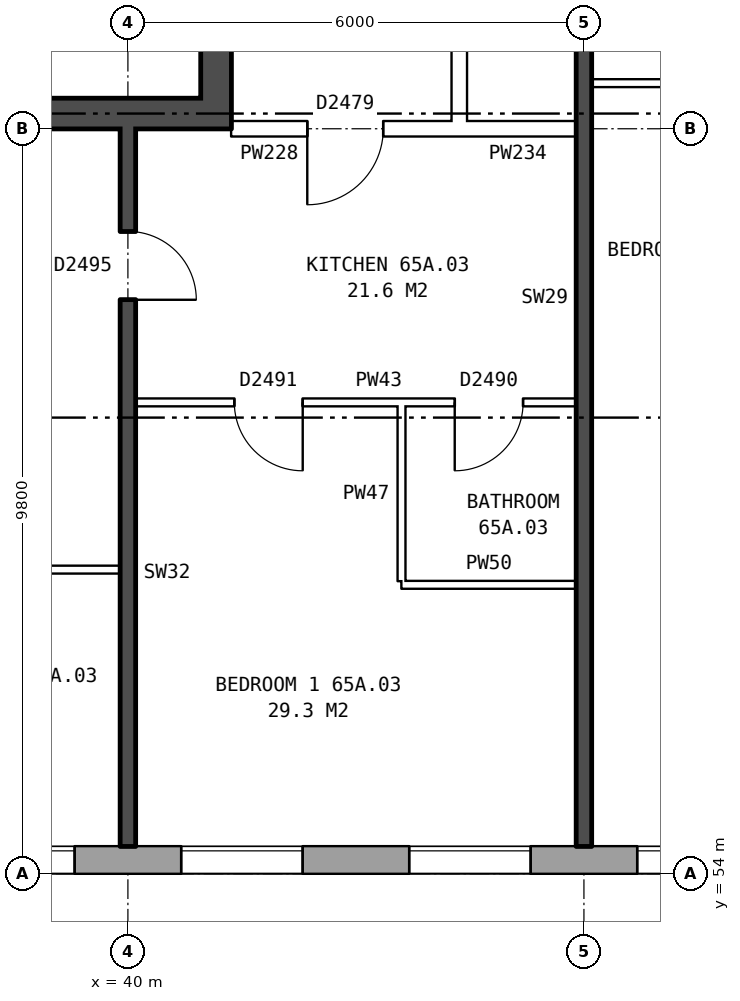
"""IFC4 building model, lengths in metres.
Left out: names, types, materials, properties, quantities, classifications, styles, units other than length and angle.
Written with IfcOpenShell. Run it as: python <this file> out.ifc"""

import sys

from ifc_helpers import new_model, si_unit, direction, frame, frame_2d, origin, place, context, subcontext, project, spatial, rectangle, extrude, element, fill, save


model = new_model("IFC4")
c1 = context("Model", 3, precision=1e-05, world=origin(), true_north=direction((0.0, 1.0)))
c2 = subcontext(c1, "Body", "Model", "MODEL_VIEW")
j1 = project(units=[si_unit("LENGTHUNIT", "METRE"), si_unit("PLANEANGLEUNIT", "RADIAN")], contexts=[c1])
p1 = place(None, origin())
s1 = spatial("IfcSite", under=j1, at=p1, CompositionType="ELEMENT")
p2 = place(p1, origin())
s2 = spatial("IfcBuilding", under=s1, at=p2, CompositionType="ELEMENT")
p3 = place(p2, frame((0.0, 0.0, 230.7)))
s3 = spatial("IfcBuildingStorey", under=s2, at=p3, CompositionType="ELEMENT", Elevation=230.7)
p4 = place(p3, frame((35.075, 54.18, 0.0), z_axis=(0.0, 0.0, 1.0), x_axis=(1.0, 0.0, 0.0)))
e1 = element("IfcWall", 1, at=p4, inside=s3, PredefinedType="STANDARD", context=c2, shape_type="SweptSolid", body=[
    extrude(rectangle(XDim=39.875, YDim=0.36, at=frame_2d((19.938, 0.0))), origin(), (0.0, 0.0, 1.0), 2.85),
])
p5 = place(p4, frame((2.625, 0.0, 0.8)))
e2 = element("IfcOpeningElement", 2, at=p5, cuts=e1, PredefinedType="OPENING", context=c2, shape_type="SweptSolid", body=[
    extrude(rectangle(XDim=1.6, YDim=1.8, at=frame_2d((0.8, 0.9))), frame((0.0, 0.19, 0.0), z_axis=(0.0, -1.0, 0.0), x_axis=(1.0, 0.0, 0.0)), (0.0, 0.0, 1.0), 0.38),
])
p6 = place(p4, frame((5.625, 0.0, 0.8)))
e3 = element("IfcOpeningElement", 3, at=p6, cuts=e1, PredefinedType="OPENING", context=c2, shape_type="SweptSolid", body=[
    extrude(rectangle(XDim=1.6, YDim=1.8, at=frame_2d((0.8, 0.9))), frame((0.0, 0.19, 0.0), z_axis=(0.0, -1.0, 0.0), x_axis=(1.0, 0.0, 0.0)), (0.0, 0.0, 1.0), 0.38),
])
p7 = place(p4, frame((8.625, 0.0, 0.8)))
e4 = element("IfcOpeningElement", 4, at=p7, cuts=e1, PredefinedType="OPENING", context=c2, shape_type="SweptSolid", body=[
    extrude(rectangle(XDim=1.6, YDim=1.8, at=frame_2d((0.8, 0.9))), frame((0.0, 0.19, 0.0), z_axis=(0.0, -1.0, 0.0), x_axis=(1.0, 0.0, 0.0)), (0.0, 0.0, 1.0), 0.38),
])
p8 = place(p4, frame((11.625, 0.0, 0.8)))
e5 = element("IfcOpeningElement", 5, at=p8, cuts=e1, PredefinedType="OPENING", context=c2, shape_type="SweptSolid", body=[
    extrude(rectangle(XDim=1.6, YDim=1.8, at=frame_2d((0.8, 0.9))), frame((0.0, 0.19, 0.0), z_axis=(0.0, -1.0, 0.0), x_axis=(1.0, 0.0, 0.0)), (0.0, 0.0, 1.0), 0.38),
])
p9 = place(p4, frame((14.075, 0.0, 0.8)))
e6 = element("IfcOpeningElement", 6, at=p9, cuts=e1, PredefinedType="OPENING", context=c2, shape_type="SweptSolid", body=[
    extrude(rectangle(XDim=1.0, YDim=1.8, at=frame_2d((0.5, 0.9))), frame((0.0, 0.19, 0.0), z_axis=(0.0, -1.0, 0.0), x_axis=(1.0, 0.0, 0.0)), (0.0, 0.0, 1.0), 0.38),
])
p10 = place(p4, frame((17.625, 0.0, 0.8)))
e7 = element("IfcOpeningElement", 7, at=p10, cuts=e1, PredefinedType="OPENING", context=c2, shape_type="SweptSolid", body=[
    extrude(rectangle(XDim=1.6, YDim=1.8, at=frame_2d((0.8, 0.9))), frame((0.0, 0.19, 0.0), z_axis=(0.0, -1.0, 0.0), x_axis=(1.0, 0.0, 0.0)), (0.0, 0.0, 1.0), 0.38),
])
p11 = place(p4, frame((20.125, 0.0, 0.8)))
e8 = element("IfcOpeningElement", 8, at=p11, cuts=e1, PredefinedType="OPENING", context=c2, shape_type="SweptSolid", body=[
    extrude(rectangle(XDim=0.6, YDim=1.2, at=frame_2d((0.3, 0.6))), frame((0.0, 0.19, 0.0), z_axis=(0.0, -1.0, 0.0), x_axis=(1.0, 0.0, 0.0)), (0.0, 0.0, 1.0), 0.38),
])
p12 = place(p4, frame((23.625, 0.0, 0.8)))
e9 = element("IfcOpeningElement", 9, at=p12, cuts=e1, PredefinedType="OPENING", context=c2, shape_type="SweptSolid", body=[
    extrude(rectangle(XDim=1.6, YDim=1.8, at=frame_2d((0.8, 0.9))), frame((0.0, 0.19, 0.0), z_axis=(0.0, -1.0, 0.0), x_axis=(1.0, 0.0, 0.0)), (0.0, 0.0, 1.0), 0.38),
])
p13 = place(p4, frame((26.625, 0.0, 0.8)))
e10 = element("IfcOpeningElement", 10, at=p13, cuts=e1, PredefinedType="OPENING", context=c2, shape_type="SweptSolid", body=[
    extrude(rectangle(XDim=1.6, YDim=1.8, at=frame_2d((0.8, 0.9))), frame((0.0, 0.19, 0.0), z_axis=(0.0, -1.0, 0.0), x_axis=(1.0, 0.0, 0.0)), (0.0, 0.0, 1.0), 0.38),
])
p14 = place(p4, frame((29.625, 0.0, 0.8)))
e11 = element("IfcOpeningElement", 11, at=p14, cuts=e1, PredefinedType="OPENING", context=c2, shape_type="SweptSolid", body=[
    extrude(rectangle(XDim=1.6, YDim=1.8, at=frame_2d((0.8, 0.9))), frame((0.0, 0.19, 0.0), z_axis=(0.0, -1.0, 0.0), x_axis=(1.0, 0.0, 0.0)), (0.0, 0.0, 1.0), 0.38),
])
p15 = place(p4, frame((32.625, 0.0, 0.8)))
e12 = element("IfcOpeningElement", 12, at=p15, cuts=e1, PredefinedType="OPENING", context=c2, shape_type="SweptSolid", body=[
    extrude(rectangle(XDim=1.6, YDim=1.8, at=frame_2d((0.8, 0.9))), frame((0.0, 0.19, 0.0), z_axis=(0.0, -1.0, 0.0), x_axis=(1.0, 0.0, 0.0)), (0.0, 0.0, 1.0), 0.38),
])
p16 = place(p4, frame((35.625, 0.0, 0.8)))
e13 = element("IfcOpeningElement", 13, at=p16, cuts=e1, PredefinedType="OPENING", context=c2, shape_type="SweptSolid", body=[
    extrude(rectangle(XDim=1.6, YDim=1.8, at=frame_2d((0.8, 0.9))), frame((0.0, 0.19, 0.0), z_axis=(0.0, -1.0, 0.0), x_axis=(1.0, 0.0, 0.0)), (0.0, 0.0, 1.0), 0.38),
])
p17 = place(p4, frame((22.125, 0.0, 1.7)))
e14 = element("IfcOpeningElement", 14, at=p17, cuts=e1, PredefinedType="OPENING", context=c2, shape_type="SweptSolid", body=[
    extrude(rectangle(XDim=0.6, YDim=0.9, at=frame_2d((0.3, 0.45))), frame((0.0, 0.19, 0.0), z_axis=(0.0, -1.0, 0.0), x_axis=(1.0, 0.0, 0.0)), (0.0, 0.0, 1.0), 0.38),
])
p18 = place(p3, frame((41.16, 76.2, 0.0), z_axis=(0.0, 0.0, 1.0), x_axis=(0.0, -1.0, 0.0)))
e15 = element("IfcWall", 15, at=p18, inside=s3, PredefinedType="SHEAR", context=c2, shape_type="SweptSolid", body=[
    extrude(rectangle(XDim=12.4, YDim=0.4, at=frame_2d((6.2, 0.0))), origin(), (0.0, 0.0, 1.0), 2.85),
])
p19 = place(p18, frame((1.325, 0.0, 0.0)))
e16 = element("IfcOpeningElement", 16, at=p19, cuts=e15, PredefinedType="OPENING", context=c2, shape_type="SweptSolid", body=[
    extrude(rectangle(XDim=1.1, YDim=2.1, at=frame_2d((0.55, 1.05))), frame((0.0, 0.21, 0.0), z_axis=(0.0, -1.0, 0.0), x_axis=(1.0, 0.0, 0.0)), (0.0, 0.0, 1.0), 0.42),
])
p20 = place(p18, frame((4.225, 0.0, 0.0)))
e17 = element("IfcOpeningElement", 17, at=p20, cuts=e15, PredefinedType="OPENING", context=c2, shape_type="SweptSolid", body=[
    extrude(rectangle(XDim=0.85, YDim=2.1, at=frame_2d((0.425, 1.05))), frame((0.0, 0.21, 0.0), z_axis=(0.0, -1.0, 0.0), x_axis=(1.0, 0.0, 0.0)), (0.0, 0.0, 1.0), 0.42),
])
p21 = place(p18, frame((7.475, 0.0, 0.0)))
e18 = element("IfcOpeningElement", 18, at=p21, cuts=e15, PredefinedType="OPENING", context=c2, shape_type="SweptSolid", body=[
    extrude(rectangle(XDim=0.85, YDim=2.1, at=frame_2d((0.425, 1.05))), frame((0.0, 0.21, 0.0), z_axis=(0.0, -1.0, 0.0), x_axis=(1.0, 0.0, 0.0)), (0.0, 0.0, 1.0), 0.42),
])
p22 = place(p18, frame((9.9, 0.0, 0.0)))
e19 = element("IfcOpeningElement", 19, at=p22, cuts=e15, PredefinedType="OPENING", context=c2, shape_type="SweptSolid", body=[
    extrude(rectangle(XDim=1.1, YDim=2.1, at=frame_2d((0.55, 1.05))), frame((0.0, 0.21, 0.0), z_axis=(0.0, -1.0, 0.0), x_axis=(1.0, 0.0, 0.0)), (0.0, 0.0, 1.0), 0.42),
])
p23 = place(p3, frame((40.96, 64.0, 0.0), z_axis=(0.0, 0.0, 1.0), x_axis=(-1.0, 0.0, 0.0)))
e20 = element("IfcWall", 20, at=p23, inside=s3, PredefinedType="SHEAR", context=c2, shape_type="SweptSolid", body=[
    extrude(rectangle(XDim=8.2, YDim=0.4, at=frame_2d((4.1, 0.0))), origin(), (0.0, 0.0, 1.0), 2.85),
])
p24 = place(p3, frame((44.36, 63.9, 0.0), z_axis=(0.0, 0.0, 1.0), x_axis=(0.0, 1.0, 0.0)))
e21 = element("IfcWall", 21, at=p24, inside=s3, PredefinedType="PARTITIONING", context=c2, shape_type="SweptSolid", body=[
    extrude(rectangle(XDim=12.2, YDim=0.2, at=frame_2d((6.1, 0.0))), origin(), (0.0, 0.0, 1.0), 2.85),
])
p25 = place(p24, frame((5.1, 0.0, 0.0)))
e22 = element("IfcOpeningElement", 22, at=p25, cuts=e21, PredefinedType="OPENING", context=c2, shape_type="SweptSolid", body=[
    extrude(rectangle(XDim=2.0, YDim=2.1, at=frame_2d((1.0, 1.05))), frame((0.0, 0.11, 0.0), z_axis=(0.0, -1.0, 0.0), x_axis=(1.0, 0.0, 0.0)), (0.0, 0.0, 1.0), 0.22),
])
p26 = place(p3, frame((43.6, 57.8, 0.0), z_axis=(0.0, 0.0, 1.0), x_axis=(1.0, 0.0, 0.0)))
e23 = element("IfcWall", 23, at=p26, inside=s3, PredefinedType="PARTITIONING", context=c2, shape_type="SweptSolid", body=[
    extrude(rectangle(XDim=2.3, YDim=0.1, at=frame_2d((1.15, 0.0))), origin(), (0.0, 0.0, 1.0), 2.85),
])
p27 = place(p3, frame((32.36, 58.0, 0.0), z_axis=(0.0, 0.0, 1.0), x_axis=(1.0, 0.0, 0.0)))
e24 = element("IfcWall", 24, at=p27, inside=s3, PredefinedType="PARTITIONING", context=c2, shape_type="SweptSolid", body=[
    extrude(rectangle(XDim=7.54, YDim=0.1, at=frame_2d((3.77, 0.0))), origin(), (0.0, 0.0, 1.0), 2.85),
])
p28 = place(p27, frame((3.32, 0.0, 0.0)))
e25 = element("IfcOpeningElement", 25, at=p28, cuts=e24, PredefinedType="OPENING", context=c2, shape_type="SweptSolid", body=[
    extrude(rectangle(XDim=0.9, YDim=2.1, at=frame_2d((0.45, 1.05))), frame((0.0, 0.06, 0.0), z_axis=(0.0, -1.0, 0.0), x_axis=(1.0, 0.0, 0.0)), (0.0, 0.0, 1.0), 0.12),
])
p29 = place(p3, frame((40.1, 60.2, 0.0), z_axis=(0.0, 0.0, 1.0), x_axis=(1.0, 0.0, 0.0)))
e26 = element("IfcWall", 26, at=p29, inside=s3, PredefinedType="PARTITIONING", context=c2, shape_type="SweptSolid", body=[
    extrude(rectangle(XDim=5.8, YDim=0.1, at=frame_2d((2.9, 0.0))), origin(), (0.0, 0.0, 1.0), 2.85),
])
p30 = place(p29, frame((1.3, 0.0, 0.0)))
e27 = element("IfcOpeningElement", 27, at=p30, cuts=e26, PredefinedType="OPENING", context=c2, shape_type="SweptSolid", body=[
    extrude(rectangle(XDim=0.9, YDim=2.1, at=frame_2d((0.45, 1.05))), frame((0.0, 0.06, 0.0), z_axis=(0.0, -1.0, 0.0), x_axis=(1.0, 0.0, 0.0)), (0.0, 0.0, 1.0), 0.12),
])
p31 = place(p29, frame((4.2, 0.0, 0.0)))
e28 = element("IfcOpeningElement", 28, at=p31, cuts=e26, PredefinedType="OPENING", context=c2, shape_type="SweptSolid", body=[
    extrude(rectangle(XDim=0.9, YDim=2.1, at=frame_2d((0.45, 1.05))), frame((0.0, 0.06, 0.0), z_axis=(0.0, -1.0, 0.0), x_axis=(1.0, 0.0, 0.0)), (0.0, 0.0, 1.0), 0.12),
])
p32 = place(p3, frame((41.36, 63.8, 0.0), z_axis=(0.0, 0.0, 1.0), x_axis=(1.0, 0.0, 0.0)))
e29 = element("IfcWall", 29, at=p32, inside=s3, PredefinedType="PARTITIONING", context=c2, shape_type="SweptSolid", body=[
    extrude(rectangle(XDim=3.0, YDim=0.2, at=frame_2d((1.5, 0.0))), origin(), (0.0, 0.0, 1.0), 2.85),
])
p33 = place(p32, frame((1.0, 0.0, 0.0)))
e30 = element("IfcOpeningElement", 30, at=p33, cuts=e29, PredefinedType="OPENING", context=c2, shape_type="SweptSolid", body=[
    extrude(rectangle(XDim=1.0, YDim=2.1, at=frame_2d((0.5, 1.05))), frame((0.0, 0.11, 0.0), z_axis=(0.0, -1.0, 0.0), x_axis=(1.0, 0.0, 0.0)), (0.0, 0.0, 1.0), 0.22),
])
p34 = place(p3, frame((44.36, 63.8, 0.0), z_axis=(0.0, 0.0, 1.0), x_axis=(1.0, 0.0, 0.0)))
e31 = element("IfcWall", 31, at=p34, inside=s3, PredefinedType="PARTITIONING", context=c2, shape_type="SweptSolid", body=[
    extrude(rectangle(XDim=1.54, YDim=0.2, at=frame_2d((0.77, 0.0))), origin(), (0.0, 0.0, 1.0), 2.85),
])
p35 = place(p3, frame((46.1, 64.4, 0.0), z_axis=(0.0, 0.0, 1.0), x_axis=(1.0, 0.0, 0.0)))
e32 = element("IfcWall", 32, at=p35, inside=s3, PredefinedType="PARTITIONING", context=c2, shape_type="SweptSolid", body=[
    extrude(rectangle(XDim=2.9, YDim=0.1, at=frame_2d((1.45, 0.0))), origin(), (0.0, 0.0, 1.0), 2.85),
])
p36 = place(p3, frame((40.0, 54.36, 0.0), z_axis=(0.0, 0.0, 1.0), x_axis=(0.0, 1.0, 0.0)))
e33 = element("IfcWall", 33, at=p36, inside=s3, PredefinedType="SOLIDWALL", context=c2, shape_type="SweptSolid", body=[
    extrude(rectangle(XDim=9.44, YDim=0.2, at=frame_2d((4.72, 0.0))), origin(), (0.0, 0.0, 1.0), 2.85),
])
p37 = place(p36, frame((7.19, 0.0, 0.0)))
e34 = element("IfcOpeningElement", 34, at=p37, cuts=e33, PredefinedType="OPENING", context=c2, shape_type="SweptSolid", body=[
    extrude(rectangle(XDim=0.9, YDim=2.1, at=frame_2d((0.45, 1.05))), frame((0.0, 0.11, 0.0), z_axis=(0.0, -1.0, 0.0), x_axis=(1.0, 0.0, 0.0)), (0.0, 0.0, 1.0), 0.22),
])
p38 = place(p3, frame((43.6, 57.85, 0.0), z_axis=(0.0, 0.0, 1.0), x_axis=(0.0, 1.0, 0.0)))
e35 = element("IfcWall", 35, at=p38, inside=s3, PredefinedType="PARTITIONING", context=c2, shape_type="SweptSolid", body=[
    extrude(rectangle(XDim=2.3, YDim=0.1, at=frame_2d((1.15, 0.0))), origin(), (0.0, 0.0, 1.0), 2.85),
])
p39 = place(p3, frame((46.0, 54.36, 0.0), z_axis=(0.0, 0.0, 1.0), x_axis=(0.0, 1.0, 0.0)))
e36 = element("IfcWall", 36, at=p39, inside=s3, PredefinedType="SOLIDWALL", context=c2, shape_type="SweptSolid", body=[
    extrude(rectangle(XDim=14.44, YDim=0.2, at=frame_2d((7.22, 0.0))), origin(), (0.0, 0.0, 1.0), 2.85),
])
p40 = place(p5, origin())
e37 = element("IfcWindow", 37, at=p40, inside=s3, PartitioningType="SINGLE_PANEL", PredefinedType="WINDOW", context=c2, shape_type="SweptSolid", body=[
    extrude(rectangle(XDim=1.6, YDim=1.8, at=frame_2d((0.8, 0.9))), frame((0.0, 0.15, 0.0), z_axis=(0.0, -1.0, 0.0), x_axis=(1.0, 0.0, 0.0)), (0.0, 0.0, 1.0), 0.06),
])
fill(e2, e37)
p41 = place(p6, origin())
e38 = element("IfcWindow", 38, at=p41, inside=s3, PartitioningType="SINGLE_PANEL", PredefinedType="WINDOW", context=c2, shape_type="SweptSolid", body=[
    extrude(rectangle(XDim=1.6, YDim=1.8, at=frame_2d((0.8, 0.9))), frame((0.0, 0.15, 0.0), z_axis=(0.0, -1.0, 0.0), x_axis=(1.0, 0.0, 0.0)), (0.0, 0.0, 1.0), 0.06),
])
fill(e3, e38)
p42 = place(p7, origin())
e39 = element("IfcWindow", 39, at=p42, inside=s3, PartitioningType="SINGLE_PANEL", PredefinedType="WINDOW", context=c2, shape_type="SweptSolid", body=[
    extrude(rectangle(XDim=1.6, YDim=1.8, at=frame_2d((0.8, 0.9))), frame((0.0, 0.15, 0.0), z_axis=(0.0, -1.0, 0.0), x_axis=(1.0, 0.0, 0.0)), (0.0, 0.0, 1.0), 0.06),
])
fill(e4, e39)
p43 = place(p8, origin())
e40 = element("IfcWindow", 40, at=p43, inside=s3, PartitioningType="SINGLE_PANEL", PredefinedType="WINDOW", context=c2, shape_type="SweptSolid", body=[
    extrude(rectangle(XDim=1.6, YDim=1.8, at=frame_2d((0.8, 0.9))), frame((0.0, 0.15, 0.0), z_axis=(0.0, -1.0, 0.0), x_axis=(1.0, 0.0, 0.0)), (0.0, 0.0, 1.0), 0.06),
])
fill(e5, e40)
p44 = place(p30, frame((0.9, 0.0, 0.0), z_axis=(0.0, 0.0, 1.0), x_axis=(-1.0, 0.0, 0.0)))
e41 = element("IfcDoor", 41, at=p44, inside=s3, OperationType="SINGLE_SWING_LEFT", PredefinedType="DOOR", context=c2, shape_type="SweptSolid", body=[
    extrude(rectangle(XDim=0.9, YDim=2.1, at=frame_2d((0.45, 1.05))), frame((0.0, 0.025, 0.0), z_axis=(0.0, -1.0, 0.0), x_axis=(1.0, 0.0, 0.0)), (0.0, 0.0, 1.0), 0.05),
])
fill(e27, e41)
p45 = place(p33, frame((1.0, 0.0, 0.0), z_axis=(0.0, 0.0, 1.0), x_axis=(-1.0, 0.0, 0.0)))
e42 = element("IfcDoor", 42, at=p45, inside=s3, OperationType="SINGLE_SWING_RIGHT", PredefinedType="DOOR", context=c2, shape_type="SweptSolid", body=[
    extrude(rectangle(XDim=1.0, YDim=2.1, at=frame_2d((0.5, 1.05))), frame((0.0, 0.025, 0.0), z_axis=(0.0, -1.0, 0.0), x_axis=(1.0, 0.0, 0.0)), (0.0, 0.0, 1.0), 0.05),
])
fill(e30, e42)
p46 = place(p37, frame((0.9, 0.0, 0.0), z_axis=(0.0, 0.0, 1.0), x_axis=(-1.0, 0.0, 0.0)))
e43 = element("IfcDoor", 43, at=p46, inside=s3, OperationType="SINGLE_SWING_RIGHT", PredefinedType="DOOR", context=c2, shape_type="SweptSolid", body=[
    extrude(rectangle(XDim=0.9, YDim=2.1, at=frame_2d((0.45, 1.05))), frame((0.0, 0.025, 0.0), z_axis=(0.0, -1.0, 0.0), x_axis=(1.0, 0.0, 0.0)), (0.0, 0.0, 1.0), 0.05),
])
fill(e34, e43)
p47 = place(p31, frame((0.9, 0.0, 0.0), z_axis=(0.0, 0.0, 1.0), x_axis=(-1.0, 0.0, 0.0)))
e44 = element("IfcDoor", 44, at=p47, inside=s3, OperationType="SINGLE_SWING_RIGHT", PredefinedType="DOOR", context=c2, shape_type="SweptSolid", body=[
    extrude(rectangle(XDim=0.9, YDim=2.1, at=frame_2d((0.45, 1.05))), frame((0.0, 0.025, 0.0), z_axis=(0.0, -1.0, 0.0), x_axis=(1.0, 0.0, 0.0)), (0.0, 0.0, 1.0), 0.05),
])
fill(e28, e44)
save(model, sys.argv[1])
